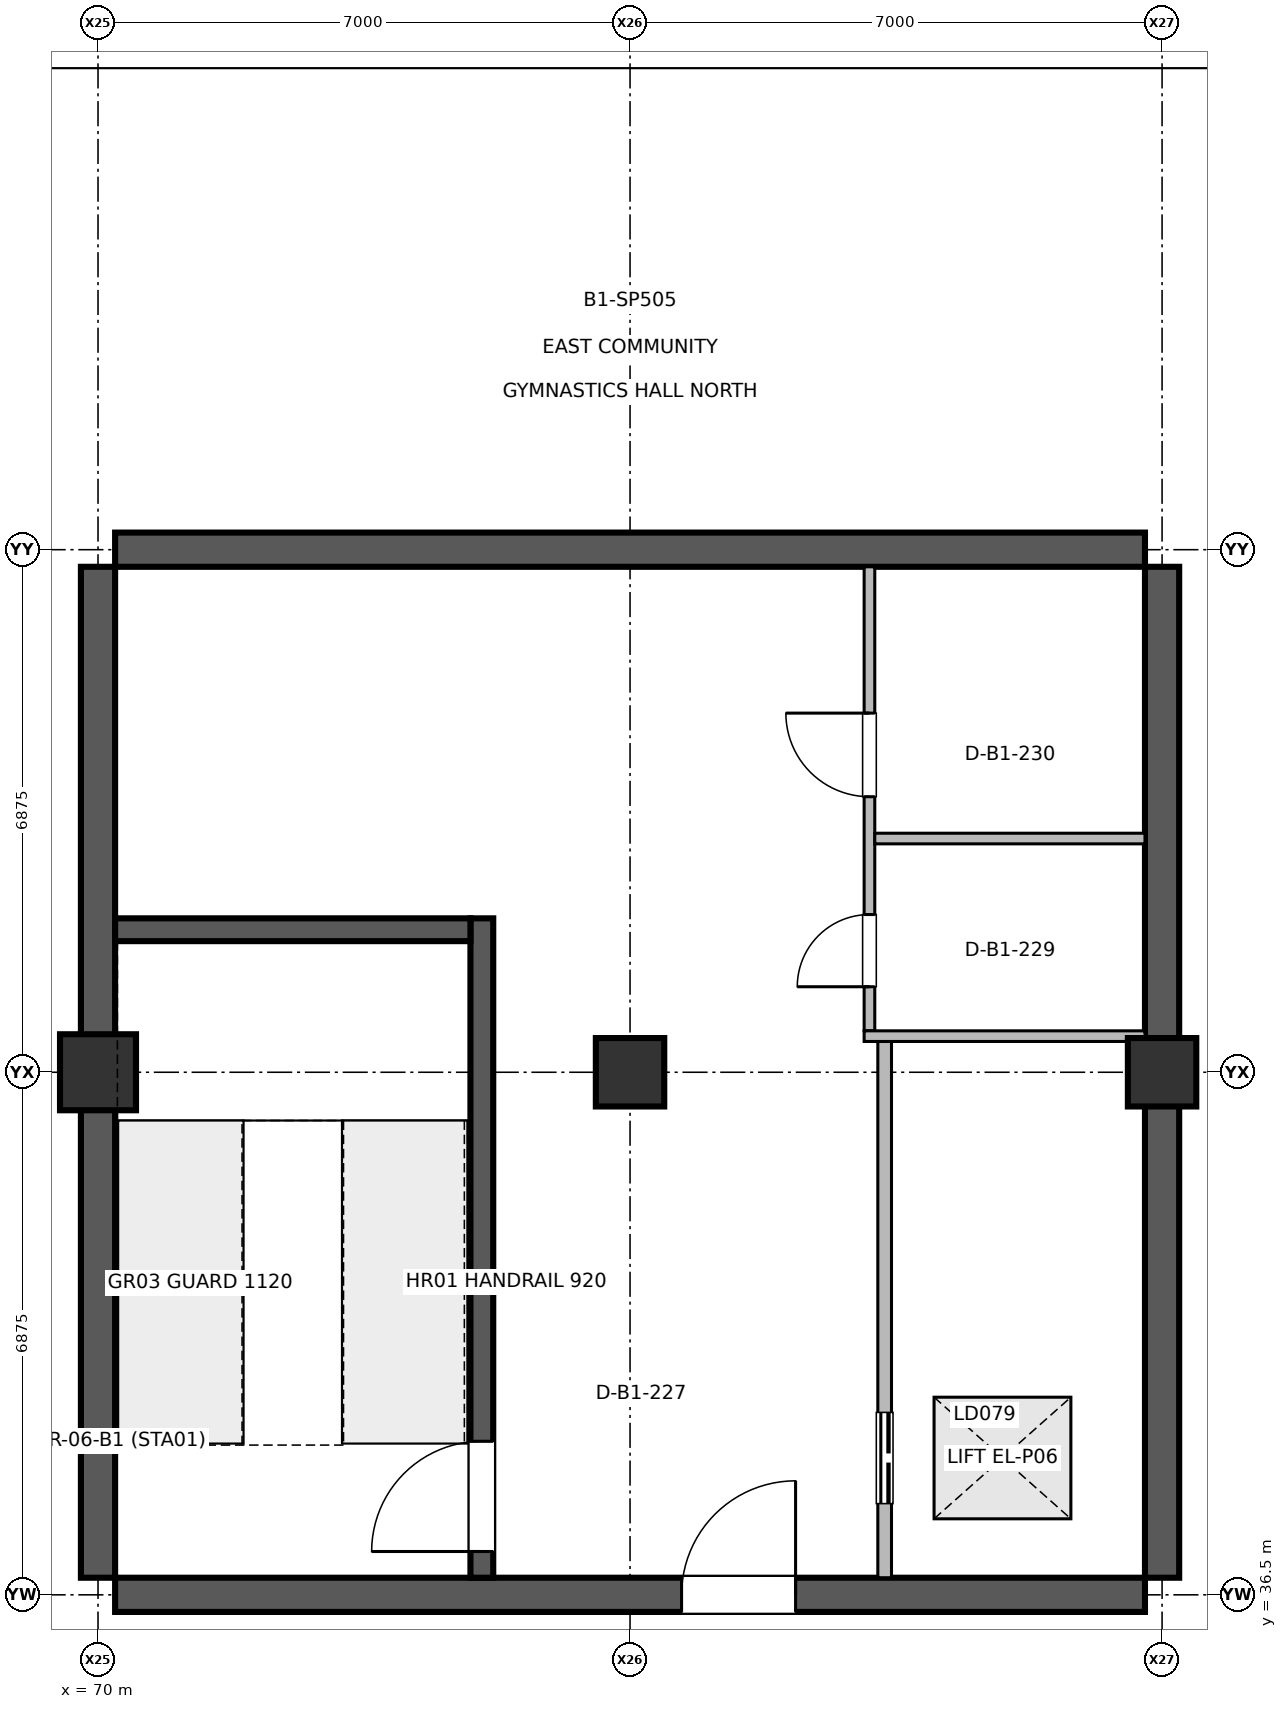
"""IFC4 building model, lengths in metres.
Left out: names, types, materials, properties, quantities, classifications, styles, units other than length and angle.
Written with IfcOpenShell. Run it as: python <this file> out.ifc"""

import sys

from ifc_helpers import new_model, si_unit, direction, frame, frame_2d, origin, origin_2d, place, context, subcontext, project, spatial, rectangle, extrude, element, fill, save


model = new_model("IFC4")
c1 = context("Model", 3, precision=1e-05, world=origin(), true_north=direction((0.0, 1.0)))
c2 = subcontext(c1, "Body", "Model", "MODEL_VIEW")
j1 = project(units=[si_unit("LENGTHUNIT", "METRE"), si_unit("PLANEANGLEUNIT", "RADIAN")], contexts=[c1])
p1 = place(None, origin())
s1 = spatial("IfcSite", under=j1, at=p1, CompositionType="ELEMENT")
p2 = place(p1, origin())
s2 = spatial("IfcBuilding", under=s1, at=p2, CompositionType="ELEMENT")
p3 = place(p2, frame((0.0, 0.0, -6.0)))
s3 = spatial("IfcBuildingStorey", under=s2, at=p3, CompositionType="ELEMENT", Elevation=-6.0)
p4 = place(p3, frame((70.0, 43.375, 0.0), z_axis=(0.0, 0.0, 1.0), x_axis=(1.0, 0.0, 0.0)))
e1 = element("IfcColumn", 1, at=p4, inside=s3, PredefinedType="COLUMN", context=c2, shape_type="SweptSolid", body=[
    extrude(rectangle(XDim=1.0, YDim=1.0, at=origin_2d()), origin(), (0.0, 0.0, 1.0), 5.998),
])
for number, where, z_axis, x_axis in (
    (2, (77.0, 43.375, 0.0), (0.0, 0.0, 1.0), (1.0, 0.0, 0.0)),
    (3, (84.0, 43.375, 0.0), (0.0, 0.0, 1.0), (1.0, 0.0, 0.0)),
):
    element("IfcColumn", number, at=place(p3, frame(where, z_axis=z_axis, x_axis=x_axis)), inside=s3, PredefinedType="COLUMN", context=c2, shape_type="SweptSolid", body=[
        extrude(rectangle(XDim=0.9, YDim=0.9, at=origin_2d()), origin(), (0.0, 0.0, 1.0), 5.998),
    ])
for number, where, z_axis, x_axis in (
    (4, (70.0, 36.725, 0.0), (0.0, 0.0, 1.0), (0.0, 1.0, 0.0)),
    (5, (84.0, 36.725, 0.0), (0.0, 0.0, 1.0), (0.0, 1.0, 0.0)),
):
    element("IfcWall", number, at=place(p3, frame(where, z_axis=z_axis, x_axis=x_axis)), inside=s3, PredefinedType="SHEAR", context=c2, shape_type="SweptSolid", body=[
        extrude(rectangle(XDim=13.3, YDim=0.45, at=frame_2d((6.65, 0.0))), origin(), (0.0, 0.0, 1.0), 5.72),
    ])
p5 = place(p3, frame((70.225, 36.5, 0.0), z_axis=(0.0, 0.0, 1.0), x_axis=(1.0, 0.0, 0.0)))
e6 = element("IfcWall", 6, at=p5, inside=s3, PredefinedType="SHEAR", context=c2, shape_type="SweptSolid", body=[
    extrude(rectangle(XDim=13.55, YDim=0.45, at=frame_2d((6.775, 0.0))), origin(), (0.0, 0.0, 1.0), 5.72),
])
p6 = place(p5, frame((7.453, 0.0, 0.0)))
e7 = element("IfcOpeningElement", 7, at=p6, cuts=e6, PredefinedType="OPENING", context=c2, shape_type="SweptSolid", body=[
    extrude(rectangle(XDim=1.5, YDim=2.2, at=frame_2d((0.75, 1.1))), frame((0.0, 0.235, 0.0), z_axis=(0.0, -1.0, 0.0), x_axis=(1.0, 0.0, 0.0)), (0.0, 0.0, 1.0), 0.47),
])
p7 = place(p3, frame((70.225, 50.25, 0.0), z_axis=(0.0, 0.0, 1.0), x_axis=(1.0, 0.0, 0.0)))
e8 = element("IfcWall", 8, at=p7, inside=s3, PredefinedType="SHEAR", context=c2, shape_type="SweptSolid", body=[
    extrude(rectangle(XDim=13.55, YDim=0.45, at=frame_2d((6.775, 0.0))), origin(), (0.0, 0.0, 1.0), 5.72),
])
p8 = place(p3, frame((75.05, 36.725, 0.0), z_axis=(0.0, 0.0, 1.0), x_axis=(0.0, 1.0, 0.0)))
e9 = element("IfcWall", 9, at=p8, inside=s3, PredefinedType="SHEAR", context=c2, shape_type="SweptSolid", body=[
    extrude(rectangle(XDim=8.675, YDim=0.3, at=frame_2d((4.337, 0.0))), origin(), (0.0, 0.0, 1.0), 5.72),
])
p9 = place(p8, frame((0.345, 0.0, 0.0)))
e10 = element("IfcOpeningElement", 10, at=p9, cuts=e9, PredefinedType="OPENING", context=c2, shape_type="SweptSolid", body=[
    extrude(rectangle(XDim=1.45, YDim=2.2, at=frame_2d((0.725, 1.1))), frame((0.0, 0.16, 0.0), z_axis=(0.0, -1.0, 0.0), x_axis=(1.0, 0.0, 0.0)), (0.0, 0.0, 1.0), 0.32),
])
p10 = place(p3, frame((80.35, 36.725, 0.0), z_axis=(0.0, 0.0, 1.0), x_axis=(0.0, 1.0, 0.0)))
e11 = element("IfcWall", 11, at=p10, inside=s3, PredefinedType="PARTITIONING", context=c2, shape_type="SweptSolid", body=[
    extrude(rectangle(XDim=7.055, YDim=0.18, at=frame_2d((3.527, 0.0))), origin(), (0.0, 0.0, 1.0), 5.02),
])
p11 = place(p10, frame((0.975, 0.0, 0.0)))
e12 = element("IfcOpeningElement", 12, at=p11, cuts=e11, PredefinedType="OPENING", context=c2, shape_type="SweptSolid", body=[
    extrude(rectangle(XDim=1.2, YDim=2.25, at=frame_2d((0.6, 1.125))), frame((0.0, 0.1, 0.0), z_axis=(0.0, -1.0, 0.0), x_axis=(1.0, 0.0, 0.0)), (0.0, 0.0, 1.0), 0.2),
])
p12 = place(p3, frame((80.15, 43.92, 0.0), z_axis=(0.0, 0.0, 1.0), x_axis=(0.0, 1.0, 0.0)))
e13 = element("IfcWall", 13, at=p12, inside=s3, PredefinedType="PARTITIONING", context=c2, shape_type="SweptSolid", body=[
    extrude(rectangle(XDim=6.105, YDim=0.14, at=frame_2d((3.052, 0.0))), origin(), (0.0, 0.0, 1.0), 5.02),
])
p13 = place(p12, frame((0.58, 0.0, 0.0)))
e14 = element("IfcOpeningElement", 14, at=p13, cuts=e13, PredefinedType="OPENING", context=c2, shape_type="SweptSolid", body=[
    extrude(rectangle(XDim=0.95, YDim=2.15, at=frame_2d((0.475, 1.075))), frame((0.0, 0.08, 0.0), z_axis=(0.0, -1.0, 0.0), x_axis=(1.0, 0.0, 0.0)), (0.0, 0.0, 1.0), 0.16),
])
p14 = place(p12, frame((3.08, 0.0, 0.0)))
e15 = element("IfcOpeningElement", 15, at=p14, cuts=e13, PredefinedType="OPENING", context=c2, shape_type="SweptSolid", body=[
    extrude(rectangle(XDim=1.1, YDim=2.15, at=frame_2d((0.55, 1.075))), frame((0.0, 0.08, 0.0), z_axis=(0.0, -1.0, 0.0), x_axis=(1.0, 0.0, 0.0)), (0.0, 0.0, 1.0), 0.16),
])
p15 = place(p3, frame((80.08, 43.85, 0.0), z_axis=(0.0, 0.0, 1.0), x_axis=(1.0, 0.0, 0.0)))
e16 = element("IfcWall", 16, at=p15, inside=s3, PredefinedType="PARTITIONING", context=c2, shape_type="SweptSolid", body=[
    extrude(rectangle(XDim=3.695, YDim=0.14, at=frame_2d((1.847, 0.0))), origin(), (0.0, 0.0, 1.0), 5.02),
])
p16 = place(p3, frame((80.22, 46.45, 0.0), z_axis=(0.0, 0.0, 1.0), x_axis=(1.0, 0.0, 0.0)))
e17 = element("IfcWall", 17, at=p16, inside=s3, PredefinedType="PARTITIONING", context=c2, shape_type="SweptSolid", body=[
    extrude(rectangle(XDim=3.555, YDim=0.14, at=frame_2d((1.777, 0.0))), origin(), (0.0, 0.0, 1.0), 5.02),
])
p17 = place(p3, frame((70.225, 45.25, 0.0), z_axis=(0.0, 0.0, 1.0), x_axis=(1.0, 0.0, 0.0)))
e18 = element("IfcWall", 18, at=p17, inside=s3, PredefinedType="SHEAR", context=c2, shape_type="SweptSolid", body=[
    extrude(rectangle(XDim=4.675, YDim=0.3, at=frame_2d((2.337, 0.0))), origin(), (0.0, 0.0, 1.0), 5.72),
])
p18 = place(p6, origin())
e19 = element("IfcDoor", 19, at=p18, inside=s3, OperationType="SINGLE_SWING_RIGHT", PredefinedType="DOOR", context=c2, shape_type="SweptSolid", body=[
    extrude(rectangle(XDim=1.5, YDim=2.2, at=frame_2d((0.75, 1.1))), frame((0.0, 0.025, 0.0), z_axis=(0.0, -1.0, 0.0), x_axis=(1.0, 0.0, 0.0)), (0.0, 0.0, 1.0), 0.05),
])
fill(e7, e19)
p19 = place(p9, origin())
e20 = element("IfcDoor", 20, at=p19, inside=s3, OperationType="SINGLE_SWING_LEFT", PredefinedType="DOOR", context=c2, shape_type="SweptSolid", body=[
    extrude(rectangle(XDim=1.45, YDim=2.2, at=frame_2d((0.725, 1.1))), frame((0.0, 0.025, 0.0), z_axis=(0.0, -1.0, 0.0), x_axis=(1.0, 0.0, 0.0)), (0.0, 0.0, 1.0), 0.05),
])
fill(e10, e20)
p20 = place(p11, origin())
e21 = element("IfcDoor", 21, at=p20, inside=s3, OperationType="DOUBLE_DOOR_SLIDING", PredefinedType="DOOR", context=c2, shape_type="SweptSolid", body=[
    extrude(rectangle(XDim=1.2, YDim=2.25, at=frame_2d((0.6, 1.125))), frame((0.0, 0.025, 0.0), z_axis=(0.0, -1.0, 0.0), x_axis=(1.0, 0.0, 0.0)), (0.0, 0.0, 1.0), 0.05),
])
fill(e12, e21)
p21 = place(p13, origin())
e22 = element("IfcDoor", 22, at=p21, inside=s3, OperationType="SINGLE_SWING_LEFT", PredefinedType="DOOR", context=c2, shape_type="SweptSolid", body=[
    extrude(rectangle(XDim=0.95, YDim=2.15, at=frame_2d((0.475, 1.075))), frame((0.0, 0.025, 0.0), z_axis=(0.0, -1.0, 0.0), x_axis=(1.0, 0.0, 0.0)), (0.0, 0.0, 1.0), 0.05),
])
fill(e14, e22)
p22 = place(p14, origin())
e23 = element("IfcDoor", 23, at=p22, inside=s3, OperationType="SINGLE_SWING_RIGHT", PredefinedType="DOOR", context=c2, shape_type="SweptSolid", body=[
    extrude(rectangle(XDim=1.1, YDim=2.15, at=frame_2d((0.55, 1.075))), frame((0.0, 0.025, 0.0), z_axis=(0.0, -1.0, 0.0), x_axis=(1.0, 0.0, 0.0)), (0.0, 0.0, 1.0), 0.05),
])
fill(e15, e23)
save(model, sys.argv[1])
